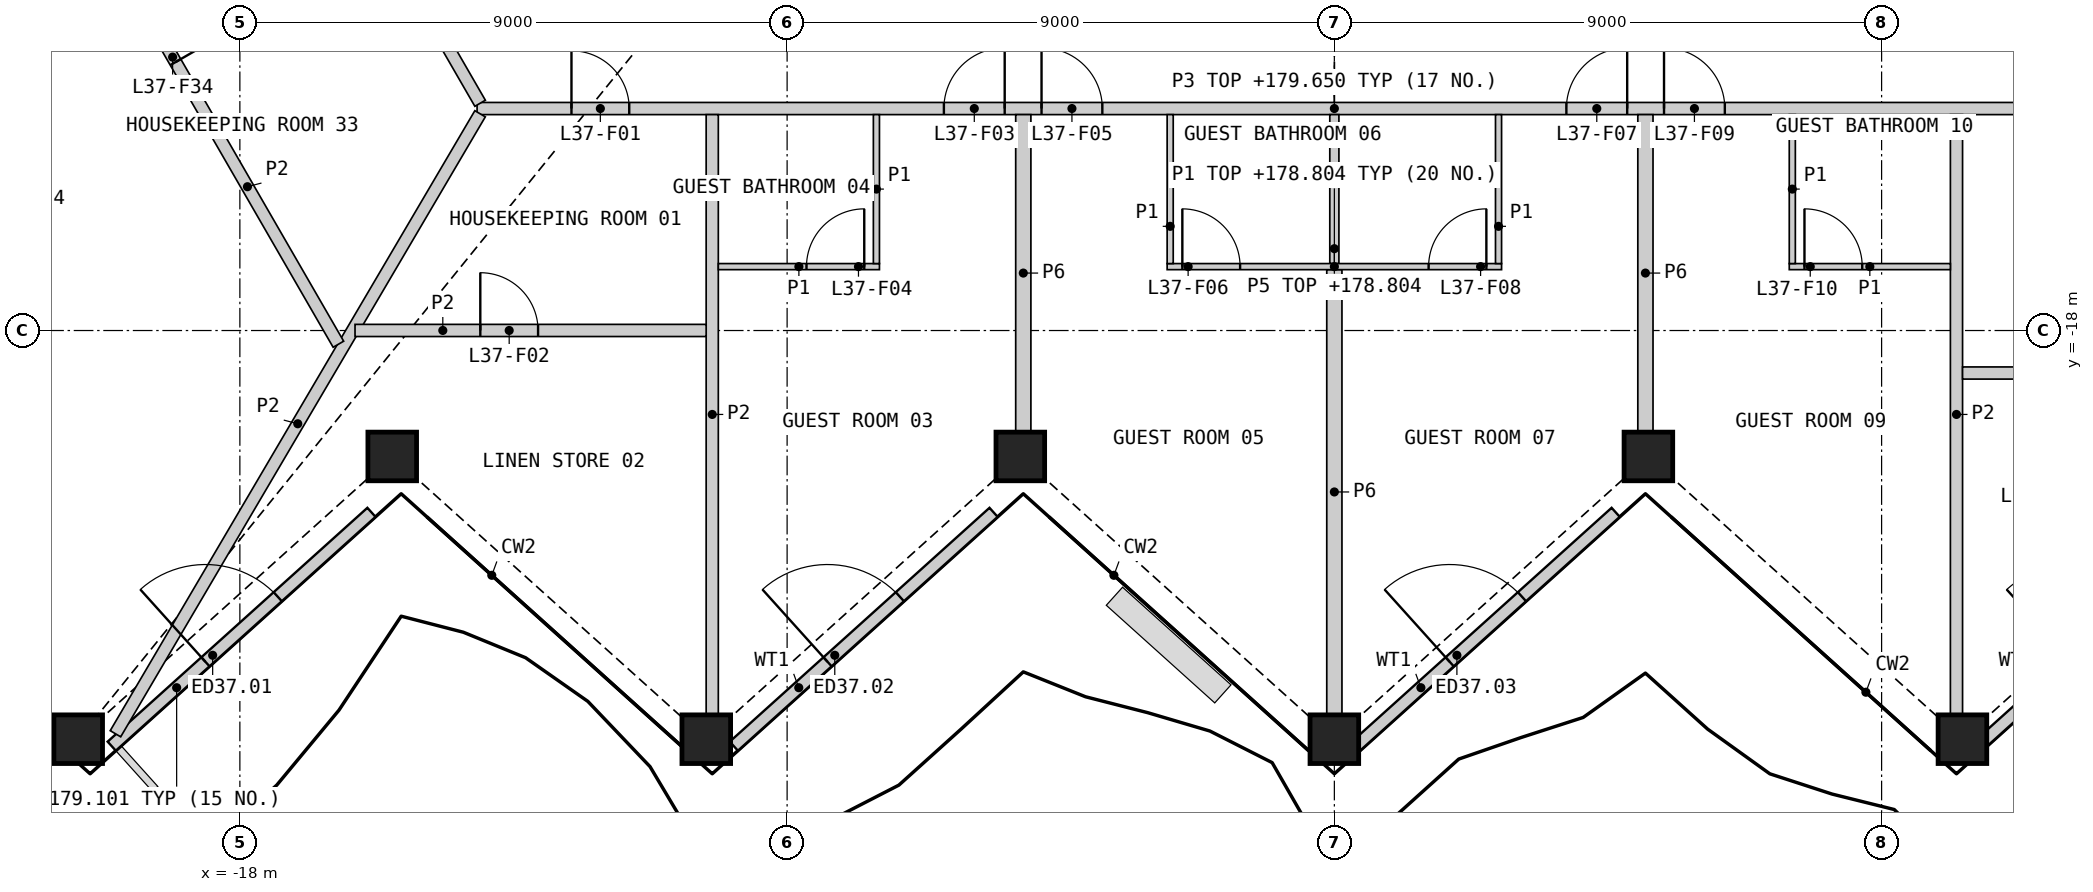
"""IFC4 building model, lengths in metres.
Left out: names, types, materials, properties, quantities, classifications, styles, units other than length and angle.
Written with IfcOpenShell. Run it as: python <this file> out.ifc"""

import sys

from ifc_helpers import new_model, si_unit, direction, frame, frame_2d, origin, origin_2d, place, context, subcontext, project, spatial, rectangle, hollow_rectangle, extrude, element, fill, save


model = new_model("IFC4")
c1 = context("Model", 3, precision=1e-05, world=origin(), true_north=direction((0.0, 1.0)))
c2 = subcontext(c1, "Body", "Model", "MODEL_VIEW")
j1 = project(units=[si_unit("LENGTHUNIT", "METRE"), si_unit("PLANEANGLEUNIT", "RADIAN")], contexts=[c1])
p1 = place(None, origin())
s1 = spatial("IfcSite", under=j1, at=p1, CompositionType="ELEMENT")
p2 = place(p1, origin())
s2 = spatial("IfcBuilding", under=s1, at=p2, CompositionType="ELEMENT")
p3 = place(p2, frame((0.0, 0.0, 176.4)))
s3 = spatial("IfcBuildingStorey", under=s2, at=p3, CompositionType="ELEMENT", Elevation=176.4)
for number, where, z_axis, x_axis in (
    (1, (-20.659, -24.722, 0.0), (0.0, 0.0, 1.0), (1.0, 0.0, 0.0)),
    (2, (-15.494, -20.071, 0.0), (0.0, 0.0, 1.0), (1.0, 0.0, 0.0)),
    (3, (-10.329, -24.722, 0.0), (0.0, 0.0, 1.0), (1.0, 0.0, 0.0)),
    (4, (-5.165, -20.071, 0.0), (0.0, 0.0, 1.0), (1.0, 0.0, 0.0)),
    (5, (0.0, -24.722, 0.0), (0.0, 0.0, 1.0), (1.0, 0.0, 0.0)),
    (6, (5.165, -20.071, 0.0), (0.0, 0.0, 1.0), (1.0, 0.0, 0.0)),
    (7, (10.329, -24.722, 0.0), (0.0, 0.0, 1.0), (1.0, 0.0, 0.0)),
):
    element("IfcColumn", number, at=place(p3, frame(where, z_axis=z_axis, x_axis=x_axis)), inside=s3, PredefinedType="COLUMN", context=c2, shape_type="SweptSolid", body=[
        extrude(hollow_rectangle(XDim=0.8, YDim=0.8, WallThickness=0.05, at=origin_2d()), origin(), (0.0, 0.0, 1.0), 3.6),
    ])
p4 = place(p3, frame((-20.108, -24.836, 0.0), z_axis=(0.0, 0.0, 1.0), x_axis=(0.74315473474, 0.669119600844, 0.0)))
e8 = element("IfcWall", 8, at=p4, inside=s3, PredefinedType="SOLIDWALL", context=c2, shape_type="SweptSolid", body=[
    extrude(rectangle(XDim=5.748, YDim=0.2, at=frame_2d((2.874, 0.0))), origin(), (0.0, 0.0, 1.0), 2.701),
])
p5 = place(p4, frame((2.074, 0.0, 0.0)))
e9 = element("IfcOpeningElement", 9, at=p5, cuts=e8, PredefinedType="OPENING", context=c2, shape_type="SweptSolid", body=[
    extrude(rectangle(XDim=1.6, YDim=2.4, at=frame_2d((0.8, 1.2))), frame((0.0, 0.11, 0.0), z_axis=(0.0, -1.0, 0.0), x_axis=(1.0, 0.0, 0.0)), (0.0, 0.0, 1.0), 0.22),
])
p6 = place(p3, frame((-9.876, -24.836, 0.0), z_axis=(0.0, 0.0, 1.0), x_axis=(0.74315473474, 0.669119600844, 0.0)))
e10 = element("IfcWall", 10, at=p6, inside=s3, PredefinedType="SOLIDWALL", context=c2, shape_type="SweptSolid", body=[
    extrude(rectangle(XDim=5.748, YDim=0.2, at=frame_2d((2.874, 0.0))), origin(), (0.0, 0.0, 1.0), 2.701),
])
p7 = place(p6, frame((2.074, 0.0, 0.0)))
e11 = element("IfcOpeningElement", 11, at=p7, cuts=e10, PredefinedType="OPENING", context=c2, shape_type="SweptSolid", body=[
    extrude(rectangle(XDim=1.6, YDim=2.4, at=frame_2d((0.8, 1.2))), frame((0.0, 0.11, 0.0), z_axis=(0.0, -1.0, 0.0), x_axis=(1.0, 0.0, 0.0)), (0.0, 0.0, 1.0), 0.22),
])
p8 = place(p3, frame((0.355, -24.836, 0.0), z_axis=(0.0, 0.0, 1.0), x_axis=(0.74315473474, 0.669119600844, 0.0)))
e12 = element("IfcWall", 12, at=p8, inside=s3, PredefinedType="SOLIDWALL", context=c2, shape_type="SweptSolid", body=[
    extrude(rectangle(XDim=5.748, YDim=0.2, at=frame_2d((2.874, 0.0))), origin(), (0.0, 0.0, 1.0), 2.701),
])
p9 = place(p8, frame((2.074, 0.0, 0.0)))
e13 = element("IfcOpeningElement", 13, at=p9, cuts=e12, PredefinedType="OPENING", context=c2, shape_type="SweptSolid", body=[
    extrude(rectangle(XDim=1.6, YDim=2.4, at=frame_2d((0.8, 1.2))), frame((0.0, 0.11, 0.0), z_axis=(0.0, -1.0, 0.0), x_axis=(1.0, 0.0, 0.0)), (0.0, 0.0, 1.0), 0.22),
])
p10 = place(p3, frame((10.587, -24.836, 0.0), z_axis=(0.0, 0.0, 1.0), x_axis=(0.74315473474, 0.669119600844, 0.0)))
e14 = element("IfcWall", 14, at=p10, inside=s3, PredefinedType="SOLIDWALL", context=c2, shape_type="SweptSolid", body=[
    extrude(rectangle(XDim=5.748, YDim=0.2, at=frame_2d((2.874, 0.0))), origin(), (0.0, 0.0, 1.0), 2.701),
])
p11 = place(p10, frame((2.074, 0.0, 0.0)))
e15 = element("IfcOpeningElement", 15, at=p11, cuts=e14, PredefinedType="OPENING", context=c2, shape_type="SweptSolid", body=[
    extrude(rectangle(XDim=1.6, YDim=2.4, at=frame_2d((0.8, 1.2))), frame((0.0, 0.11, 0.0), z_axis=(0.0, -1.0, 0.0), x_axis=(1.0, 0.0, 0.0)), (0.0, 0.0, 1.0), 0.22),
])
p12 = place(p3, frame((-14.099, -14.349, 0.0), z_axis=(0.0, 0.0, 1.0), x_axis=(1.0, 0.0, 0.0)))
e16 = element("IfcWall", 16, at=p12, inside=s3, PredefinedType="PARTITIONING", context=c2, shape_type="SweptSolid", body=[
    extrude(rectangle(XDim=28.198, YDim=0.2, at=frame_2d((14.099, 0.0))), origin(), (0.0, 0.0, 1.0), 3.25),
])
p13 = place(p12, frame((1.552, 0.0, 0.0)))
e17 = element("IfcOpeningElement", 17, at=p13, cuts=e16, PredefinedType="OPENING", context=c2, shape_type="SweptSolid", body=[
    extrude(rectangle(XDim=0.95, YDim=2.1, at=frame_2d((0.475, 1.05))), frame((0.0, 0.11, 0.0), z_axis=(0.0, -1.0, 0.0), x_axis=(1.0, 0.0, 0.0)), (0.0, 0.0, 1.0), 0.22),
])
p14 = place(p12, frame((7.677, 0.0, 0.0)))
e18 = element("IfcOpeningElement", 18, at=p14, cuts=e16, PredefinedType="OPENING", context=c2, shape_type="SweptSolid", body=[
    extrude(rectangle(XDim=1.0, YDim=2.1, at=frame_2d((0.5, 1.05))), frame((0.0, 0.11, 0.0), z_axis=(0.0, -1.0, 0.0), x_axis=(1.0, 0.0, 0.0)), (0.0, 0.0, 1.0), 0.22),
])
p15 = place(p12, frame((9.283, 0.0, 0.0)))
e19 = element("IfcOpeningElement", 19, at=p15, cuts=e16, PredefinedType="OPENING", context=c2, shape_type="SweptSolid", body=[
    extrude(rectangle(XDim=1.0, YDim=2.1, at=frame_2d((0.5, 1.05))), frame((0.0, 0.11, 0.0), z_axis=(0.0, -1.0, 0.0), x_axis=(1.0, 0.0, 0.0)), (0.0, 0.0, 1.0), 0.22),
])
p16 = place(p12, frame((17.915, 0.0, 0.0)))
e20 = element("IfcOpeningElement", 20, at=p16, cuts=e16, PredefinedType="OPENING", context=c2, shape_type="SweptSolid", body=[
    extrude(rectangle(XDim=1.0, YDim=2.1, at=frame_2d((0.5, 1.05))), frame((0.0, 0.11, 0.0), z_axis=(0.0, -1.0, 0.0), x_axis=(1.0, 0.0, 0.0)), (0.0, 0.0, 1.0), 0.22),
])
p17 = place(p12, frame((19.521, 0.0, 0.0)))
e21 = element("IfcOpeningElement", 21, at=p17, cuts=e16, PredefinedType="OPENING", context=c2, shape_type="SweptSolid", body=[
    extrude(rectangle(XDim=1.0, YDim=2.1, at=frame_2d((0.5, 1.05))), frame((0.0, 0.11, 0.0), z_axis=(0.0, -1.0, 0.0), x_axis=(1.0, 0.0, 0.0)), (0.0, 0.0, 1.0), 0.22),
])
p18 = place(p12, frame((25.696, 0.0, 0.0)))
e22 = element("IfcOpeningElement", 22, at=p18, cuts=e16, PredefinedType="OPENING", context=c2, shape_type="SweptSolid", body=[
    extrude(rectangle(XDim=0.95, YDim=2.1, at=frame_2d((0.475, 1.05))), frame((0.0, 0.11, 0.0), z_axis=(0.0, -1.0, 0.0), x_axis=(1.0, 0.0, 0.0)), (0.0, 0.0, 1.0), 0.22),
])
p19 = place(p3, frame((0.0, -24.312, 0.0), z_axis=(0.0, 0.0, 1.0), x_axis=(0.0, 1.0, 0.0)))
e23 = element("IfcWall", 23, at=p19, inside=s3, PredefinedType="PARTITIONING", context=c2, shape_type="SweptSolid", body=[
    extrude(rectangle(XDim=7.313, YDim=0.25, at=frame_2d((3.656, 0.0))), origin(), (0.0, 0.0, 1.0), 2.404),
])
for number, where, z_axis, x_axis in (
    (24, (-5.116, -19.661, 0.0), (0.0, 0.0, 1.0), (0.0, 1.0, 0.0)),
    (25, (5.116, -19.661, 0.0), (0.0, 0.0, 1.0), (0.0, 1.0, 0.0)),
):
    element("IfcWall", number, at=place(p3, frame(where, z_axis=z_axis, x_axis=x_axis)), inside=s3, PredefinedType="PARTITIONING", context=c2, shape_type="SweptSolid", body=[
        extrude(rectangle(XDim=5.212, YDim=0.25, at=frame_2d((2.606, 0.0))), origin(), (0.0, 0.0, 1.0), 2.404),
    ])
p20 = place(p3, frame((-15.55, -11.662, 0.0), z_axis=(0.0, 0.0, 1.0), x_axis=(0.500048608389, -0.865997337899, 0.0)))
e26 = element("IfcWall", 26, at=p20, inside=s3, PredefinedType="PARTITIONING", context=c2, shape_type="SweptSolid", body=[
    extrude(rectangle(XDim=3.002, YDim=0.2, at=frame_2d((1.501, 0.0))), origin(), (0.0, 0.0, 1.0), 3.25),
])
p21 = place(p3, frame((-20.046, -24.632, 0.0), z_axis=(0.0, 0.0, 1.0), x_axis=(0.50691549935, 0.86199575203, 0.0)))
e27 = element("IfcWall", 27, at=p21, inside=s3, PredefinedType="PARTITIONING", context=c2, shape_type="SweptSolid", body=[
    extrude(rectangle(XDim=11.83, YDim=0.2, at=frame_2d((5.915, 0.0))), origin(), (0.0, 0.0, 1.0), 2.404),
])
p22 = place(p3, frame((-22.363, -7.862, 0.0), z_axis=(0.0, 0.0, 1.0), x_axis=(0.500009728207, -0.866019787128, 0.0)))
e28 = element("IfcWall", 28, at=p22, inside=s3, PredefinedType="PARTITIONING", context=c2, shape_type="SweptSolid", body=[
    extrude(rectangle(XDim=11.967, YDim=0.2, at=frame_2d((5.983, 0.0))), origin(), (0.0, 0.0, 1.0), 2.404),
])
p23 = place(p22, frame((5.658, 0.0, 0.0)))
e29 = element("IfcOpeningElement", 29, at=p23, cuts=e28, PredefinedType="OPENING", context=c2, shape_type="SweptSolid", body=[
    extrude(rectangle(XDim=0.95, YDim=2.1, at=frame_2d((0.475, 1.05))), frame((0.0, 0.11, 0.0), z_axis=(0.0, -1.0, 0.0), x_axis=(1.0, 0.0, 0.0)), (0.0, 0.0, 1.0), 0.22),
])
for number, where, z_axis, x_axis in (
    (30, (-10.231, -24.312, 0.0), (0.0, 0.0, 1.0), (0.0, 1.0, 0.0)),
    (31, (10.231, -24.312, 0.0), (0.0, 0.0, 1.0), (0.0, 1.0, 0.0)),
):
    element("IfcWall", number, at=place(p3, frame(where, z_axis=z_axis, x_axis=x_axis)), inside=s3, PredefinedType="PARTITIONING", context=c2, shape_type="SweptSolid", body=[
        extrude(rectangle(XDim=9.863, YDim=0.2, at=frame_2d((4.931, 0.0))), origin(), (0.0, 0.0, 1.0), 2.404),
    ])
p24 = place(p3, frame((10.331, -18.699, 0.0), z_axis=(0.0, 0.0, 1.0), x_axis=(1.0, 0.0, 0.0)))
e32 = element("IfcWall", 32, at=p24, inside=s3, PredefinedType="PARTITIONING", context=c2, shape_type="SweptSolid", body=[
    extrude(rectangle(XDim=6.179, YDim=0.2, at=frame_2d((3.09, 0.0))), origin(), (0.0, 0.0, 1.0), 2.404),
])
p25 = place(p24, frame((2.866, 0.0, 0.0)))
e33 = element("IfcOpeningElement", 33, at=p25, cuts=e32, PredefinedType="OPENING", context=c2, shape_type="SweptSolid", body=[
    extrude(rectangle(XDim=0.95, YDim=2.1, at=frame_2d((0.475, 1.05))), frame((0.0, 0.11, 0.0), z_axis=(0.0, -1.0, 0.0), x_axis=(1.0, 0.0, 0.0)), (0.0, 0.0, 1.0), 0.22),
])
p26 = place(p3, frame((-16.106, -17.999, 0.0), z_axis=(0.0, 0.0, 1.0), x_axis=(1.0, 0.0, 0.0)))
e34 = element("IfcWall", 34, at=p26, inside=s3, PredefinedType="PARTITIONING", context=c2, shape_type="SweptSolid", body=[
    extrude(rectangle(XDim=5.775, YDim=0.2, at=frame_2d((2.887, 0.0))), origin(), (0.0, 0.0, 1.0), 2.404),
])
p27 = place(p26, frame((2.06, 0.0, 0.0)))
e35 = element("IfcOpeningElement", 35, at=p27, cuts=e34, PredefinedType="OPENING", context=c2, shape_type="SweptSolid", body=[
    extrude(rectangle(XDim=0.95, YDim=2.1, at=frame_2d((0.475, 1.05))), frame((0.0, 0.11, 0.0), z_axis=(0.0, -1.0, 0.0), x_axis=(1.0, 0.0, 0.0)), (0.0, 0.0, 1.0), 0.22),
])
p28 = place(p3, frame((0.0, -16.899, 0.0), z_axis=(0.0, 0.0, 1.0), x_axis=(0.0, 1.0, 0.0)))
e36 = element("IfcWall", 36, at=p28, inside=s3, PredefinedType="PLUMBINGWALL", context=c2, shape_type="SweptSolid", body=[
    extrude(rectangle(XDim=2.45, YDim=0.15, at=frame_2d((1.225, 0.0))), origin(), (0.0, 0.0, 1.0), 2.404),
])
p29 = place(p3, frame((-2.75, -16.949, 0.0), z_axis=(0.0, 0.0, 1.0), x_axis=(1.0, 0.0, 0.0)))
e37 = element("IfcWall", 37, at=p29, inside=s3, PredefinedType="PARTITIONING", context=c2, shape_type="SweptSolid", body=[
    extrude(rectangle(XDim=5.5, YDim=0.1, at=frame_2d((2.75, 0.0))), origin(), (0.0, 0.0, 1.0), 2.404),
])
p30 = place(p29, frame((0.25, 0.0, 0.0)))
e38 = element("IfcOpeningElement", 38, at=p30, cuts=e37, PredefinedType="OPENING", context=c2, shape_type="SweptSolid", body=[
    extrude(rectangle(XDim=0.95, YDim=2.1, at=frame_2d((0.475, 1.05))), frame((0.0, 0.06, 0.0), z_axis=(0.0, -1.0, 0.0), x_axis=(1.0, 0.0, 0.0)), (0.0, 0.0, 1.0), 0.12),
])
p31 = place(p29, frame((4.3, 0.0, 0.0)))
e39 = element("IfcOpeningElement", 39, at=p31, cuts=e37, PredefinedType="OPENING", context=c2, shape_type="SweptSolid", body=[
    extrude(rectangle(XDim=0.95, YDim=2.1, at=frame_2d((0.475, 1.05))), frame((0.0, 0.06, 0.0), z_axis=(0.0, -1.0, 0.0), x_axis=(1.0, 0.0, 0.0)), (0.0, 0.0, 1.0), 0.12),
])
p32 = place(p3, frame((-10.131, -16.949, 0.0), z_axis=(0.0, 0.0, 1.0), x_axis=(1.0, 0.0, 0.0)))
e40 = element("IfcWall", 40, at=p32, inside=s3, PredefinedType="PARTITIONING", context=c2, shape_type="SweptSolid", body=[
    extrude(rectangle(XDim=2.65, YDim=0.1, at=frame_2d((1.325, 0.0))), origin(), (0.0, 0.0, 1.0), 2.404),
])
p33 = place(p32, frame((1.45, 0.0, 0.0)))
e41 = element("IfcOpeningElement", 41, at=p33, cuts=e40, PredefinedType="OPENING", context=c2, shape_type="SweptSolid", body=[
    extrude(rectangle(XDim=0.95, YDim=2.1, at=frame_2d((0.475, 1.05))), frame((0.0, 0.06, 0.0), z_axis=(0.0, -1.0, 0.0), x_axis=(1.0, 0.0, 0.0)), (0.0, 0.0, 1.0), 0.12),
])
p34 = place(p3, frame((7.481, -16.949, 0.0), z_axis=(0.0, 0.0, 1.0), x_axis=(1.0, 0.0, 0.0)))
e42 = element("IfcWall", 42, at=p34, inside=s3, PredefinedType="PARTITIONING", context=c2, shape_type="SweptSolid", body=[
    extrude(rectangle(XDim=2.65, YDim=0.1, at=frame_2d((1.325, 0.0))), origin(), (0.0, 0.0, 1.0), 2.404),
])
p35 = place(p34, frame((0.25, 0.0, 0.0)))
e43 = element("IfcOpeningElement", 43, at=p35, cuts=e42, PredefinedType="OPENING", context=c2, shape_type="SweptSolid", body=[
    extrude(rectangle(XDim=0.95, YDim=2.1, at=frame_2d((0.475, 1.05))), frame((0.0, 0.06, 0.0), z_axis=(0.0, -1.0, 0.0), x_axis=(1.0, 0.0, 0.0)), (0.0, 0.0, 1.0), 0.12),
])
for number, where, z_axis, x_axis in (
    (44, (-7.531, -16.899, 0.0), (0.0, 0.0, 1.0), (0.0, 1.0, 0.0)),
    (45, (-2.7, -16.899, 0.0), (0.0, 0.0, 1.0), (0.0, 1.0, 0.0)),
    (46, (2.7, -16.899, 0.0), (0.0, 0.0, 1.0), (0.0, 1.0, 0.0)),
    (47, (7.531, -16.899, 0.0), (0.0, 0.0, 1.0), (0.0, 1.0, 0.0)),
):
    element("IfcWall", number, at=place(p3, frame(where, z_axis=z_axis, x_axis=x_axis)), inside=s3, PredefinedType="PARTITIONING", context=c2, shape_type="SweptSolid", body=[
        extrude(rectangle(XDim=2.45, YDim=0.1, at=frame_2d((1.225, 0.0))), origin(), (0.0, 0.0, 1.0), 2.404),
    ])
p36 = place(p5, origin())
e48 = element("IfcDoor", 48, at=p36, inside=s3, OperationType="DOUBLE_DOOR_SINGLE_SWING", PredefinedType="DOOR", context=c2, shape_type="SweptSolid", body=[
    extrude(rectangle(XDim=1.6, YDim=2.4, at=frame_2d((0.8, 1.2))), frame((0.0, 0.025, 0.0), z_axis=(0.0, -1.0, 0.0), x_axis=(1.0, 0.0, 0.0)), (0.0, 0.0, 1.0), 0.05),
])
fill(e9, e48)
p37 = place(p7, origin())
e49 = element("IfcDoor", 49, at=p37, inside=s3, OperationType="DOUBLE_DOOR_SINGLE_SWING", PredefinedType="DOOR", context=c2, shape_type="SweptSolid", body=[
    extrude(rectangle(XDim=1.6, YDim=2.4, at=frame_2d((0.8, 1.2))), frame((0.0, 0.025, 0.0), z_axis=(0.0, -1.0, 0.0), x_axis=(1.0, 0.0, 0.0)), (0.0, 0.0, 1.0), 0.05),
])
fill(e11, e49)
p38 = place(p9, origin())
e50 = element("IfcDoor", 50, at=p38, inside=s3, OperationType="DOUBLE_DOOR_SINGLE_SWING", PredefinedType="DOOR", context=c2, shape_type="SweptSolid", body=[
    extrude(rectangle(XDim=1.6, YDim=2.4, at=frame_2d((0.8, 1.2))), frame((0.0, 0.025, 0.0), z_axis=(0.0, -1.0, 0.0), x_axis=(1.0, 0.0, 0.0)), (0.0, 0.0, 1.0), 0.05),
])
fill(e13, e50)
p39 = place(p13, origin())
e51 = element("IfcDoor", 51, at=p39, inside=s3, OperationType="SINGLE_SWING_LEFT", PredefinedType="DOOR", context=c2, shape_type="SweptSolid", body=[
    extrude(rectangle(XDim=0.95, YDim=2.1, at=frame_2d((0.475, 1.05))), frame((0.0, 0.025, 0.0), z_axis=(0.0, -1.0, 0.0), x_axis=(1.0, 0.0, 0.0)), (0.0, 0.0, 1.0), 0.05),
])
fill(e17, e51)
p40 = place(p27, origin())
e52 = element("IfcDoor", 52, at=p40, inside=s3, OperationType="SINGLE_SWING_LEFT", PredefinedType="DOOR", context=c2, shape_type="SweptSolid", body=[
    extrude(rectangle(XDim=0.95, YDim=2.1, at=frame_2d((0.475, 1.05))), frame((0.0, 0.025, 0.0), z_axis=(0.0, -1.0, 0.0), x_axis=(1.0, 0.0, 0.0)), (0.0, 0.0, 1.0), 0.05),
])
fill(e35, e52)
p41 = place(p14, origin())
e53 = element("IfcDoor", 53, at=p41, inside=s3, OperationType="SINGLE_SWING_RIGHT", PredefinedType="DOOR", context=c2, shape_type="SweptSolid", body=[
    extrude(rectangle(XDim=1.0, YDim=2.1, at=frame_2d((0.5, 1.05))), frame((0.0, 0.025, 0.0), z_axis=(0.0, -1.0, 0.0), x_axis=(1.0, 0.0, 0.0)), (0.0, 0.0, 1.0), 0.05),
])
fill(e18, e53)
p42 = place(p33, origin())
e54 = element("IfcDoor", 54, at=p42, inside=s3, OperationType="SINGLE_SWING_RIGHT", PredefinedType="DOOR", context=c2, shape_type="SweptSolid", body=[
    extrude(rectangle(XDim=0.95, YDim=2.1, at=frame_2d((0.475, 1.05))), frame((0.0, 0.025, 0.0), z_axis=(0.0, -1.0, 0.0), x_axis=(1.0, 0.0, 0.0)), (0.0, 0.0, 1.0), 0.05),
])
fill(e41, e54)
p43 = place(p15, origin())
e55 = element("IfcDoor", 55, at=p43, inside=s3, OperationType="SINGLE_SWING_LEFT", PredefinedType="DOOR", context=c2, shape_type="SweptSolid", body=[
    extrude(rectangle(XDim=1.0, YDim=2.1, at=frame_2d((0.5, 1.05))), frame((0.0, 0.025, 0.0), z_axis=(0.0, -1.0, 0.0), x_axis=(1.0, 0.0, 0.0)), (0.0, 0.0, 1.0), 0.05),
])
fill(e19, e55)
p44 = place(p30, origin())
e56 = element("IfcDoor", 56, at=p44, inside=s3, OperationType="SINGLE_SWING_LEFT", PredefinedType="DOOR", context=c2, shape_type="SweptSolid", body=[
    extrude(rectangle(XDim=0.95, YDim=2.1, at=frame_2d((0.475, 1.05))), frame((0.0, 0.025, 0.0), z_axis=(0.0, -1.0, 0.0), x_axis=(1.0, 0.0, 0.0)), (0.0, 0.0, 1.0), 0.05),
])
fill(e38, e56)
p45 = place(p16, origin())
e57 = element("IfcDoor", 57, at=p45, inside=s3, OperationType="SINGLE_SWING_RIGHT", PredefinedType="DOOR", context=c2, shape_type="SweptSolid", body=[
    extrude(rectangle(XDim=1.0, YDim=2.1, at=frame_2d((0.5, 1.05))), frame((0.0, 0.025, 0.0), z_axis=(0.0, -1.0, 0.0), x_axis=(1.0, 0.0, 0.0)), (0.0, 0.0, 1.0), 0.05),
])
fill(e20, e57)
p46 = place(p31, origin())
e58 = element("IfcDoor", 58, at=p46, inside=s3, OperationType="SINGLE_SWING_RIGHT", PredefinedType="DOOR", context=c2, shape_type="SweptSolid", body=[
    extrude(rectangle(XDim=0.95, YDim=2.1, at=frame_2d((0.475, 1.05))), frame((0.0, 0.025, 0.0), z_axis=(0.0, -1.0, 0.0), x_axis=(1.0, 0.0, 0.0)), (0.0, 0.0, 1.0), 0.05),
])
fill(e39, e58)
p47 = place(p17, origin())
e59 = element("IfcDoor", 59, at=p47, inside=s3, OperationType="SINGLE_SWING_LEFT", PredefinedType="DOOR", context=c2, shape_type="SweptSolid", body=[
    extrude(rectangle(XDim=1.0, YDim=2.1, at=frame_2d((0.5, 1.05))), frame((0.0, 0.025, 0.0), z_axis=(0.0, -1.0, 0.0), x_axis=(1.0, 0.0, 0.0)), (0.0, 0.0, 1.0), 0.05),
])
fill(e21, e59)
p48 = place(p35, origin())
e60 = element("IfcDoor", 60, at=p48, inside=s3, OperationType="SINGLE_SWING_LEFT", PredefinedType="DOOR", context=c2, shape_type="SweptSolid", body=[
    extrude(rectangle(XDim=0.95, YDim=2.1, at=frame_2d((0.475, 1.05))), frame((0.0, 0.025, 0.0), z_axis=(0.0, -1.0, 0.0), x_axis=(1.0, 0.0, 0.0)), (0.0, 0.0, 1.0), 0.05),
])
fill(e43, e60)
p49 = place(p23, origin())
e61 = element("IfcDoor", 61, at=p49, inside=s3, OperationType="SINGLE_SWING_RIGHT", PredefinedType="DOOR", context=c2, shape_type="SweptSolid", body=[
    extrude(rectangle(XDim=0.95, YDim=2.1, at=frame_2d((0.475, 1.05))), frame((0.0, 0.025, 0.0), z_axis=(0.0, -1.0, 0.0), x_axis=(1.0, 0.0, 0.0)), (0.0, 0.0, 1.0), 0.05),
])
fill(e29, e61)
save(model, sys.argv[1])
